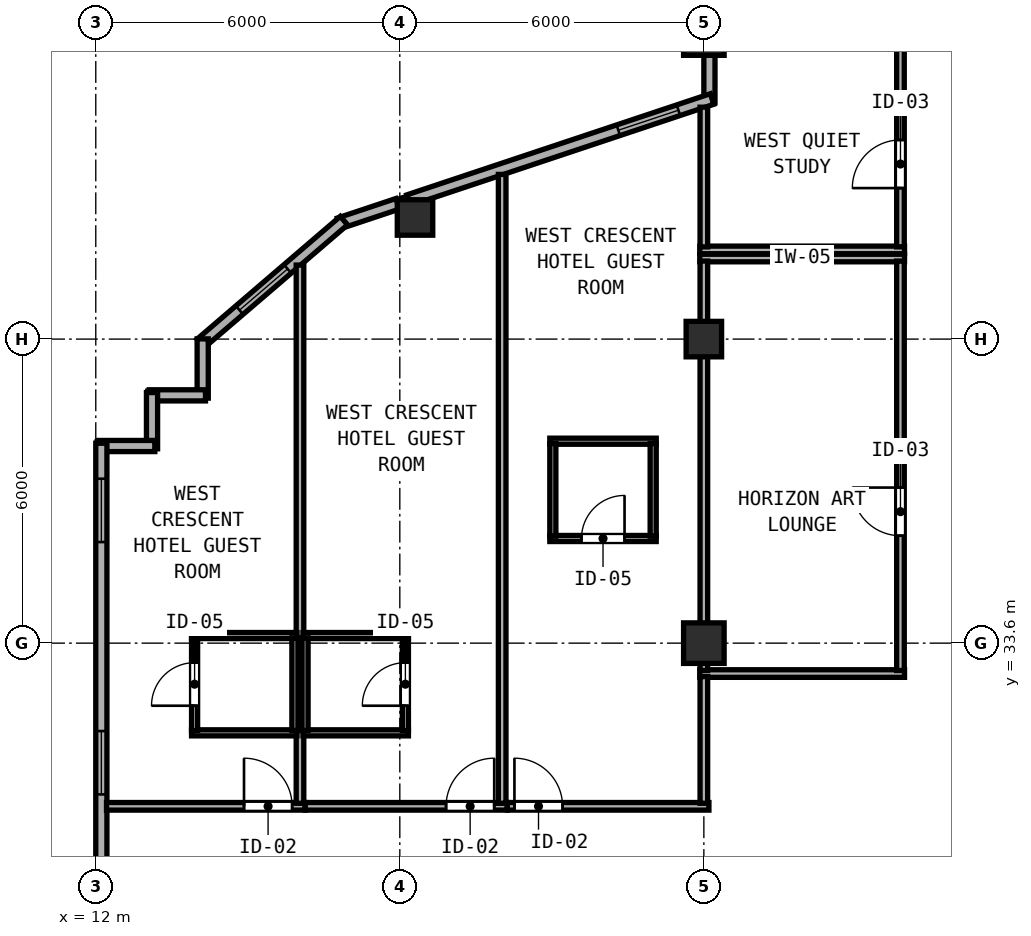
"""IFC4 building model, lengths in metres.
Left out: names, types, materials, properties, quantities, classifications, styles, units other than length and angle.
Written with IfcOpenShell. Run it as: python <this file> out.ifc"""

import sys

from ifc_helpers import new_model, si_unit, direction, frame, frame_2d, origin, origin_2d, place, context, subcontext, project, spatial, rectangle, hollow_rectangle, extrude, element, fill, save


model = new_model("IFC4")
c1 = context("Model", 3, precision=1e-05, world=origin(), true_north=direction((0.0, 1.0)))
c2 = subcontext(c1, "Body", "Model", "MODEL_VIEW")
j1 = project(units=[si_unit("LENGTHUNIT", "METRE"), si_unit("PLANEANGLEUNIT", "RADIAN")], contexts=[c1])
p1 = place(None, origin())
s1 = spatial("IfcSite", under=j1, at=p1, CompositionType="ELEMENT")
p2 = place(p1, origin())
s2 = spatial("IfcBuilding", under=s1, at=p2, CompositionType="ELEMENT")
p3 = place(p2, frame((0.0, 0.0, 254.45)))
s3 = spatial("IfcBuildingStorey", under=s2, at=p3, CompositionType="ELEMENT", Elevation=254.45)
for number, where, z_axis, x_axis in (
    (1, (24.0, 33.6, 0.0), (0.0, 0.0, 1.0), (1.0, 0.0, 0.0)),
    (2, (24.0, 45.6, 0.0), (0.0, 0.0, 1.0), (1.0, 0.0, 0.0)),
):
    element("IfcColumn", number, at=place(p3, frame(where, z_axis=z_axis, x_axis=x_axis)), inside=s3, PredefinedType="COLUMN", context=c2, shape_type="SweptSolid", body=[
        extrude(hollow_rectangle(XDim=0.8, YDim=0.8, WallThickness=0.03, at=origin_2d()), origin(), (0.0, 0.0, 1.0), 3.85),
    ])
for number, where, z_axis, x_axis in (
    (3, (24.0, 39.6, 0.0), (0.0, 0.0, 1.0), (1.0, 0.0, 0.0)),
    (4, (18.3, 42.0, 0.0), (0.0, 0.0, 1.0), (1.0, 0.0, 0.0)),
):
    element("IfcColumn", number, at=place(p3, frame(where, z_axis=z_axis, x_axis=x_axis)), inside=s3, PredefinedType="COLUMN", context=c2, shape_type="SweptSolid", body=[
        extrude(hollow_rectangle(XDim=0.7, YDim=0.7, WallThickness=0.026, at=origin_2d()), origin(), (0.0, 0.0, 1.0), 3.85),
    ])
p4 = place(p3, frame((24.11, 45.208, 0.0), z_axis=(0.0, 0.0, 1.0), x_axis=(0.0, -1.0, 0.0)))
e5 = element("IfcWall", 5, at=p4, inside=s3, PredefinedType="SOLIDWALL", context=c2, shape_type="SweptSolid", body=[
    extrude(rectangle(XDim=0.942, YDim=0.22, at=frame_2d((0.471, 0.0))), origin(), (0.0, 0.0, 1.0), 3.315),
])
p5 = place(p3, frame((24.162, 44.338, 0.0), z_axis=(0.0, 0.0, 1.0), x_axis=(-0.948687165594, -0.31621616315, 0.0)))
e6 = element("IfcWall", 6, at=p5, inside=s3, PredefinedType="SOLIDWALL", context=c2, shape_type="SweptSolid", body=[
    extrude(rectangle(XDim=6.312, YDim=0.22, at=frame_2d((3.156, 0.0))), origin(), (0.0, 0.0, 1.0), 3.315),
])
p6 = place(p5, frame((0.7, 0.0, 0.85)))
e7 = element("IfcOpeningElement", 7, at=p6, cuts=e6, PredefinedType="OPENING", context=c2, shape_type="SweptSolid", body=[
    extrude(rectangle(XDim=1.25, YDim=1.95, at=frame_2d((0.625, 0.975))), frame((0.0, 0.12, 0.0), z_axis=(0.0, -1.0, 0.0), x_axis=(1.0, 0.0, 0.0)), (0.0, 0.0, 1.0), 0.24),
])
p7 = place(p3, frame((17.958, 42.27, 0.0), z_axis=(0.0, 0.0, 1.0), x_axis=(-0.948683298051, -0.316227766017, 0.0)))
e8 = element("IfcWall", 8, at=p7, inside=s3, PredefinedType="SOLIDWALL", context=c2, shape_type="SweptSolid", body=[
    extrude(rectangle(XDim=1.218, YDim=0.22, at=frame_2d((0.609, 0.0))), origin(), (0.0, 0.0, 1.0), 3.67),
])
p8 = place(p3, frame((16.897, 41.938, 0.0), z_axis=(0.0, 0.0, 1.0), x_axis=(-0.759279729622, -0.650764390686, 0.0)))
e9 = element("IfcWall", 9, at=p8, inside=s3, PredefinedType="SOLIDWALL", context=c2, shape_type="SweptSolid", body=[
    extrude(rectangle(XDim=3.726, YDim=0.22, at=frame_2d((1.863, 0.0))), origin(), (0.0, 0.0, 1.0), 3.67),
])
p9 = place(p8, frame((1.464, 0.0, 0.85)))
e10 = element("IfcOpeningElement", 10, at=p9, cuts=e9, PredefinedType="OPENING", context=c2, shape_type="SweptSolid", body=[
    extrude(rectangle(XDim=1.25, YDim=1.95, at=frame_2d((0.625, 0.975))), frame((0.0, 0.12, 0.0), z_axis=(0.0, -1.0, 0.0), x_axis=(1.0, 0.0, 0.0)), (0.0, 0.0, 1.0), 0.24),
])
p10 = place(p3, frame((14.11, 39.604, 0.0), z_axis=(0.0, 0.0, 1.0), x_axis=(0.0, -1.0, 0.0)))
e11 = element("IfcWall", 11, at=p10, inside=s3, PredefinedType="SOLIDWALL", context=c2, shape_type="SweptSolid", body=[
    extrude(rectangle(XDim=1.169, YDim=0.22, at=frame_2d((0.585, 0.0))), origin(), (0.0, 0.0, 1.0), 3.67),
])
p11 = place(p3, frame((14.165, 38.49, 0.0), z_axis=(0.0, 0.0, 1.0), x_axis=(-1.0, 0.0, 0.0)))
e12 = element("IfcWall", 12, at=p11, inside=s3, PredefinedType="SOLIDWALL", context=c2, shape_type="SweptSolid", body=[
    extrude(rectangle(XDim=1.11, YDim=0.22, at=frame_2d((0.555, 0.0))), origin(), (0.0, 0.0, 1.0), 3.67),
])
p12 = place(p3, frame((13.11, 38.545, 0.0), z_axis=(0.0, 0.0, 1.0), x_axis=(0.0, -1.0, 0.0)))
e13 = element("IfcWall", 13, at=p12, inside=s3, PredefinedType="SOLIDWALL", context=c2, shape_type="SweptSolid", body=[
    extrude(rectangle(XDim=1.11, YDim=0.22, at=frame_2d((0.555, 0.0))), origin(), (0.0, 0.0, 1.0), 3.67),
])
p13 = place(p3, frame((13.165, 37.49, 0.0), z_axis=(0.0, 0.0, 1.0), x_axis=(-1.0, 0.0, 0.0)))
e14 = element("IfcWall", 14, at=p13, inside=s3, PredefinedType="SOLIDWALL", context=c2, shape_type="SweptSolid", body=[
    extrude(rectangle(XDim=1.11, YDim=0.22, at=frame_2d((0.555, 0.0))), origin(), (0.0, 0.0, 1.0), 3.67),
])
p14 = place(p3, frame((12.11, 37.545, 0.0), z_axis=(0.0, 0.0, 1.0), x_axis=(0.0, -1.0, 0.0)))
e15 = element("IfcWall", 15, at=p14, inside=s3, PredefinedType="SOLIDWALL", context=c2, shape_type="SweptSolid", body=[
    extrude(rectangle(XDim=21.145, YDim=0.22, at=frame_2d((10.573, 0.0))), origin(), (0.0, 0.0, 1.0), 3.67),
])
p15 = place(p14, frame((0.7, 0.0, 0.85)))
e16 = element("IfcOpeningElement", 16, at=p15, cuts=e15, PredefinedType="OPENING", context=c2, shape_type="SweptSolid", body=[
    extrude(rectangle(XDim=1.25, YDim=1.95, at=frame_2d((0.625, 0.975))), frame((0.0, 0.12, 0.0), z_axis=(0.0, -1.0, 0.0), x_axis=(1.0, 0.0, 0.0)), (0.0, 0.0, 1.0), 0.24),
])
p16 = place(p14, frame((5.68, 0.0, 0.85)))
e17 = element("IfcOpeningElement", 17, at=p16, cuts=e15, PredefinedType="OPENING", context=c2, shape_type="SweptSolid", body=[
    extrude(rectangle(XDim=1.25, YDim=1.95, at=frame_2d((0.625, 0.975))), frame((0.0, 0.12, 0.0), z_axis=(0.0, -1.0, 0.0), x_axis=(1.0, 0.0, 0.0)), (0.0, 0.0, 1.0), 0.24),
])
p17 = place(p14, frame((11.5, 0.0, 0.85)))
e18 = element("IfcOpeningElement", 18, at=p17, cuts=e15, PredefinedType="OPENING", context=c2, shape_type="SweptSolid", body=[
    extrude(rectangle(XDim=1.25, YDim=1.95, at=frame_2d((0.625, 0.975))), frame((0.0, 0.12, 0.0), z_axis=(0.0, -1.0, 0.0), x_axis=(1.0, 0.0, 0.0)), (0.0, 0.0, 1.0), 0.24),
])
p18 = place(p14, frame((16.9, 0.0, 0.85)))
e19 = element("IfcOpeningElement", 19, at=p18, cuts=e15, PredefinedType="OPENING", context=c2, shape_type="SweptSolid", body=[
    extrude(rectangle(XDim=1.25, YDim=1.95, at=frame_2d((0.625, 0.975))), frame((0.0, 0.12, 0.0), z_axis=(0.0, -1.0, 0.0), x_axis=(1.0, 0.0, 0.0)), (0.0, 0.0, 1.0), 0.24),
])
for number, where, z_axis, x_axis in (
    (20, (23.92, 41.2, 0.0), (0.0, 0.0, 1.0), (1.0, 0.0, 0.0)),
    (21, (23.92, 33.0, 0.0), (0.0, 0.0, 1.0), (1.0, 0.0, 0.0)),
):
    element("IfcWall", number, at=place(p3, frame(where, z_axis=z_axis, x_axis=x_axis)), inside=s3, PredefinedType="PARTITIONING", context=c2, shape_type="SweptSolid", body=[
        extrude(rectangle(XDim=4.04, YDim=0.15, at=frame_2d((2.02, 0.0))), origin(), (0.0, 0.0, 1.0), 3.67),
    ])
p19 = place(p3, frame((24.0, 33.06, 0.0), z_axis=(0.0, 0.0, 1.0), x_axis=(0.0, 1.0, 0.0)))
e22 = element("IfcWall", 22, at=p19, inside=s3, PredefinedType="PARTITIONING", context=c2, shape_type="SweptSolid", body=[
    extrude(rectangle(XDim=8.08, YDim=0.15, at=frame_2d((4.04, 0.0))), origin(), (0.0, 0.0, 1.0), 3.315),
])
p20 = place(p3, frame((27.88, 33.06, 0.0), z_axis=(0.0, 0.0, 1.0), x_axis=(0.0, 1.0, 0.0)))
e23 = element("IfcWall", 23, at=p20, inside=s3, PredefinedType="PARTITIONING", context=c2, shape_type="SweptSolid", body=[
    extrude(rectangle(XDim=8.08, YDim=0.15, at=frame_2d((4.04, 0.0))), origin(), (0.0, 0.0, 1.0), 3.67),
])
p21 = place(p20, frame((3.61, 0.0, 0.0), z_axis=(0.0, 0.0, 1.0), x_axis=(-1.0, 0.0, 0.0)))
e24 = element("IfcOpeningElement", 24, at=p21, cuts=e23, PredefinedType="OPENING", context=c2, shape_type="SweptSolid", body=[
    extrude(rectangle(XDim=0.95, YDim=2.12, at=frame_2d((0.475, 1.06))), frame((0.0, 0.085, 0.0), z_axis=(0.0, -1.0, 0.0), x_axis=(1.0, 0.0, 0.0)), (0.0, 0.0, 1.0), 0.17),
])
p22 = place(p3, frame((23.92, 41.36, 0.0), z_axis=(0.0, 0.0, 1.0), x_axis=(1.0, 0.0, 0.0)))
e25 = element("IfcWall", 25, at=p22, inside=s3, PredefinedType="PARTITIONING", context=c2, shape_type="SweptSolid", body=[
    extrude(rectangle(XDim=4.04, YDim=0.15, at=frame_2d((2.02, 0.0))), origin(), (0.0, 0.0, 1.0), 3.67),
])
p23 = place(p3, frame((24.0, 41.42, 0.0), z_axis=(0.0, 0.0, 1.0), x_axis=(0.0, 1.0, 0.0)))
e26 = element("IfcWall", 26, at=p23, inside=s3, PredefinedType="PARTITIONING", context=c2, shape_type="SweptSolid", body=[
    extrude(rectangle(XDim=2.757, YDim=0.15, at=frame_2d((1.378, 0.0))), origin(), (0.0, 0.0, 1.0), 3.315),
])
p24 = place(p3, frame((27.88, 41.42, 0.0), z_axis=(0.0, 0.0, 1.0), x_axis=(0.0, 1.0, 0.0)))
e27 = element("IfcWall", 27, at=p24, inside=s3, PredefinedType="PARTITIONING", context=c2, shape_type="SweptSolid", body=[
    extrude(rectangle(XDim=4.54, YDim=0.15, at=frame_2d((2.27, 0.0))), origin(), (0.0, 0.0, 1.0), 3.67),
])
p25 = place(p24, frame((2.11, 0.0, 0.0), z_axis=(0.0, 0.0, 1.0), x_axis=(-1.0, 0.0, 0.0)))
e28 = element("IfcOpeningElement", 28, at=p25, cuts=e27, PredefinedType="OPENING", context=c2, shape_type="SweptSolid", body=[
    extrude(rectangle(XDim=0.95, YDim=2.12, at=frame_2d((0.475, 1.06))), frame((0.0, 0.085, 0.0), z_axis=(0.0, -1.0, 0.0), x_axis=(1.0, 0.0, 0.0)), (0.0, 0.0, 1.0), 0.17),
])
p26 = place(p3, frame((12.212, 30.38, 0.0), z_axis=(0.0, 0.0, 1.0), x_axis=(1.0, 0.0, 0.0)))
e29 = element("IfcWall", 29, at=p26, inside=s3, PredefinedType="PARTITIONING", context=c2, shape_type="SweptSolid", body=[
    extrude(rectangle(XDim=3.918, YDim=0.15, at=frame_2d((1.959, 0.0))), origin(), (0.0, 0.0, 1.0), 3.67),
])
p27 = place(p26, frame((2.713, 0.0, 0.0)))
e30 = element("IfcOpeningElement", 30, at=p27, cuts=e29, PredefinedType="OPENING", context=c2, shape_type="SweptSolid", body=[
    extrude(rectangle(XDim=0.95, YDim=2.15, at=frame_2d((0.475, 1.075))), frame((0.0, 0.085, 0.0), z_axis=(0.0, -1.0, 0.0), x_axis=(1.0, 0.0, 0.0)), (0.0, 0.0, 1.0), 0.17),
])
p28 = place(p3, frame((16.03, 30.44, 0.0), z_axis=(0.0, 0.0, 1.0), x_axis=(0.0, 1.0, 0.0)))
e31 = element("IfcWall", 31, at=p28, inside=s3, PredefinedType="PARTITIONING", context=c2, shape_type="SweptSolid", body=[
    extrude(rectangle(XDim=10.621, YDim=0.15, at=frame_2d((5.311, 0.0))), origin(), (0.0, 0.0, 1.0), 3.67),
])
for number, where, z_axis, x_axis in (
    (32, (13.89, 33.75, 0.0), (0.0, 0.0, 1.0), (1.0, 0.0, 0.0)),
    (33, (13.89, 31.83, 0.0), (0.0, 0.0, 1.0), (1.0, 0.0, 0.0)),
):
    element("IfcWall", number, at=place(p3, frame(where, z_axis=z_axis, x_axis=x_axis)), inside=s3, PredefinedType="PARTITIONING", context=c2, shape_type="SweptSolid", body=[
        extrude(rectangle(XDim=2.08, YDim=0.12, at=frame_2d((1.04, 0.0))), origin(), (0.0, 0.0, 1.0), 3.67),
    ])
p29 = place(p3, frame((13.95, 31.875, 0.0), z_axis=(0.0, 0.0, 1.0), x_axis=(0.0, 1.0, 0.0)))
e34 = element("IfcWall", 34, at=p29, inside=s3, PredefinedType="PARTITIONING", context=c2, shape_type="SweptSolid", body=[
    extrude(rectangle(XDim=1.83, YDim=0.12, at=frame_2d((0.915, 0.0))), origin(), (0.0, 0.0, 1.0), 3.67),
])
p30 = place(p29, frame((1.34, 0.0, 0.0), z_axis=(0.0, 0.0, 1.0), x_axis=(-1.0, 0.0, 0.0)))
e35 = element("IfcOpeningElement", 35, at=p30, cuts=e34, PredefinedType="OPENING", context=c2, shape_type="SweptSolid", body=[
    extrude(rectangle(XDim=0.85, YDim=2.1, at=frame_2d((0.425, 1.05))), frame((0.0, 0.07, 0.0), z_axis=(0.0, -1.0, 0.0), x_axis=(1.0, 0.0, 0.0)), (0.0, 0.0, 1.0), 0.14),
])
p31 = place(p3, frame((15.93, 31.875, 0.0), z_axis=(0.0, 0.0, 1.0), x_axis=(0.0, 1.0, 0.0)))
e36 = element("IfcWall", 36, at=p31, inside=s3, PredefinedType="PARTITIONING", context=c2, shape_type="SweptSolid", body=[
    extrude(rectangle(XDim=1.83, YDim=0.12, at=frame_2d((0.915, 0.0))), origin(), (0.0, 0.0, 1.0), 3.67),
])
p32 = place(p3, frame((16.132, 30.38, 0.0), z_axis=(0.0, 0.0, 1.0), x_axis=(1.0, 0.0, 0.0)))
e37 = element("IfcWall", 37, at=p32, inside=s3, PredefinedType="PARTITIONING", context=c2, shape_type="SweptSolid", body=[
    extrude(rectangle(XDim=3.988, YDim=0.15, at=frame_2d((1.994, 0.0))), origin(), (0.0, 0.0, 1.0), 3.67),
])
p33 = place(p32, frame((2.781, 0.0, 0.0)))
e38 = element("IfcOpeningElement", 38, at=p33, cuts=e37, PredefinedType="OPENING", context=c2, shape_type="SweptSolid", body=[
    extrude(rectangle(XDim=0.95, YDim=2.15, at=frame_2d((0.475, 1.075))), frame((0.0, 0.085, 0.0), z_axis=(0.0, -1.0, 0.0), x_axis=(1.0, 0.0, 0.0)), (0.0, 0.0, 1.0), 0.17),
])
p34 = place(p3, frame((20.02, 30.44, 0.0), z_axis=(0.0, 0.0, 1.0), x_axis=(0.0, 1.0, 0.0)))
e39 = element("IfcWall", 39, at=p34, inside=s3, PredefinedType="PARTITIONING", context=c2, shape_type="SweptSolid", body=[
    extrude(rectangle(XDim=12.41, YDim=0.15, at=frame_2d((6.205, 0.0))), origin(), (0.0, 0.0, 1.0), 3.67),
])
for number, where, z_axis, x_axis in (
    (40, (16.09, 33.75, 0.0), (0.0, 0.0, 1.0), (1.0, 0.0, 0.0)),
    (41, (16.09, 31.83, 0.0), (0.0, 0.0, 1.0), (1.0, 0.0, 0.0)),
):
    element("IfcWall", number, at=place(p3, frame(where, z_axis=z_axis, x_axis=x_axis)), inside=s3, PredefinedType="PARTITIONING", context=c2, shape_type="SweptSolid", body=[
        extrude(rectangle(XDim=2.08, YDim=0.12, at=frame_2d((1.04, 0.0))), origin(), (0.0, 0.0, 1.0), 3.67),
    ])
p35 = place(p3, frame((16.13, 31.875, 0.0), z_axis=(0.0, 0.0, 1.0), x_axis=(0.0, 1.0, 0.0)))
e42 = element("IfcWall", 42, at=p35, inside=s3, PredefinedType="PARTITIONING", context=c2, shape_type="SweptSolid", body=[
    extrude(rectangle(XDim=1.83, YDim=0.12, at=frame_2d((0.915, 0.0))), origin(), (0.0, 0.0, 1.0), 3.67),
])
p36 = place(p3, frame((18.11, 31.875, 0.0), z_axis=(0.0, 0.0, 1.0), x_axis=(0.0, 1.0, 0.0)))
e43 = element("IfcWall", 43, at=p36, inside=s3, PredefinedType="PARTITIONING", context=c2, shape_type="SweptSolid", body=[
    extrude(rectangle(XDim=1.83, YDim=0.12, at=frame_2d((0.915, 0.0))), origin(), (0.0, 0.0, 1.0), 3.67),
])
p37 = place(p36, frame((0.49, 0.0, 0.0)))
e44 = element("IfcOpeningElement", 44, at=p37, cuts=e43, PredefinedType="OPENING", context=c2, shape_type="SweptSolid", body=[
    extrude(rectangle(XDim=0.85, YDim=2.1, at=frame_2d((0.425, 1.05))), frame((0.0, 0.07, 0.0), z_axis=(0.0, -1.0, 0.0), x_axis=(1.0, 0.0, 0.0)), (0.0, 0.0, 1.0), 0.14),
])
p38 = place(p3, frame((20.122, 30.38, 0.0), z_axis=(0.0, 0.0, 1.0), x_axis=(1.0, 0.0, 0.0)))
e45 = element("IfcWall", 45, at=p38, inside=s3, PredefinedType="PARTITIONING", context=c2, shape_type="SweptSolid", body=[
    extrude(rectangle(XDim=3.978, YDim=0.15, at=frame_2d((1.989, 0.0))), origin(), (0.0, 0.0, 1.0), 3.67),
])
p39 = place(p38, frame((0.14, 0.0, 0.0)))
e46 = element("IfcOpeningElement", 46, at=p39, cuts=e45, PredefinedType="OPENING", context=c2, shape_type="SweptSolid", body=[
    extrude(rectangle(XDim=0.95, YDim=2.15, at=frame_2d((0.475, 1.075))), frame((0.0, 0.085, 0.0), z_axis=(0.0, -1.0, 0.0), x_axis=(1.0, 0.0, 0.0)), (0.0, 0.0, 1.0), 0.17),
])
p40 = place(p3, frame((24.0, 30.44, 0.0), z_axis=(0.0, 0.0, 1.0), x_axis=(0.0, 1.0, 0.0)))
e47 = element("IfcWall", 47, at=p40, inside=s3, PredefinedType="PARTITIONING", context=c2, shape_type="SweptSolid", body=[
    extrude(rectangle(XDim=2.5, YDim=0.15, at=frame_2d((1.25, 0.0))), origin(), (0.0, 0.0, 1.0), 3.315),
])
p41 = place(p3, frame((20.96, 37.585, 0.0), z_axis=(0.0, 0.0, 1.0), x_axis=(1.0, 0.0, 0.0)))
e48 = element("IfcWall", 48, at=p41, inside=s3, PredefinedType="PARTITIONING", context=c2, shape_type="SweptSolid", body=[
    extrude(rectangle(XDim=2.1, YDim=0.12, at=frame_2d((1.05, 0.0))), origin(), (0.0, 0.0, 1.0), 3.67),
])
p42 = place(p3, frame((20.96, 35.665, 0.0), z_axis=(0.0, 0.0, 1.0), x_axis=(1.0, 0.0, 0.0)))
e49 = element("IfcWall", 49, at=p42, inside=s3, PredefinedType="PARTITIONING", context=c2, shape_type="SweptSolid", body=[
    extrude(rectangle(XDim=2.1, YDim=0.12, at=frame_2d((1.05, 0.0))), origin(), (0.0, 0.0, 1.0), 3.67),
])
p43 = place(p42, frame((0.625, 0.0, 0.0)))
e50 = element("IfcOpeningElement", 50, at=p43, cuts=e49, PredefinedType="OPENING", context=c2, shape_type="SweptSolid", body=[
    extrude(rectangle(XDim=0.85, YDim=2.1, at=frame_2d((0.425, 1.05))), frame((0.0, 0.07, 0.0), z_axis=(0.0, -1.0, 0.0), x_axis=(1.0, 0.0, 0.0)), (0.0, 0.0, 1.0), 0.14),
])
for number, where, z_axis, x_axis in (
    (51, (21.02, 35.71, 0.0), (0.0, 0.0, 1.0), (0.0, 1.0, 0.0)),
    (52, (23.0, 35.71, 0.0), (0.0, 0.0, 1.0), (0.0, 1.0, 0.0)),
):
    element("IfcWall", number, at=place(p3, frame(where, z_axis=z_axis, x_axis=x_axis)), inside=s3, PredefinedType="PARTITIONING", context=c2, shape_type="SweptSolid", body=[
        extrude(rectangle(XDim=1.83, YDim=0.12, at=frame_2d((0.915, 0.0))), origin(), (0.0, 0.0, 1.0), 3.67),
    ])
p44 = place(p6, origin())
e53 = element("IfcWindow", 53, at=p44, inside=s3, PartitioningType="SINGLE_PANEL", PredefinedType="WINDOW", context=c2, shape_type="SweptSolid", body=[
    extrude(rectangle(XDim=1.25, YDim=1.95, at=frame_2d((0.625, 0.975))), frame((0.0, 0.03, 0.0), z_axis=(0.0, -1.0, 0.0), x_axis=(1.0, 0.0, 0.0)), (0.0, 0.0, 1.0), 0.06),
])
fill(e7, e53)
p45 = place(p9, origin())
e54 = element("IfcWindow", 54, at=p45, inside=s3, PartitioningType="SINGLE_PANEL", PredefinedType="WINDOW", context=c2, shape_type="SweptSolid", body=[
    extrude(rectangle(XDim=1.25, YDim=1.95, at=frame_2d((0.625, 0.975))), frame((0.0, 0.03, 0.0), z_axis=(0.0, -1.0, 0.0), x_axis=(1.0, 0.0, 0.0)), (0.0, 0.0, 1.0), 0.06),
])
fill(e10, e54)
p46 = place(p15, origin())
e55 = element("IfcWindow", 55, at=p46, inside=s3, PartitioningType="SINGLE_PANEL", PredefinedType="WINDOW", context=c2, shape_type="SweptSolid", body=[
    extrude(rectangle(XDim=1.25, YDim=1.95, at=frame_2d((0.625, 0.975))), frame((0.0, 0.03, 0.0), z_axis=(0.0, -1.0, 0.0), x_axis=(1.0, 0.0, 0.0)), (0.0, 0.0, 1.0), 0.06),
])
fill(e16, e55)
p47 = place(p16, origin())
e56 = element("IfcWindow", 56, at=p47, inside=s3, PartitioningType="SINGLE_PANEL", PredefinedType="WINDOW", context=c2, shape_type="SweptSolid", body=[
    extrude(rectangle(XDim=1.25, YDim=1.95, at=frame_2d((0.625, 0.975))), frame((0.0, 0.03, 0.0), z_axis=(0.0, -1.0, 0.0), x_axis=(1.0, 0.0, 0.0)), (0.0, 0.0, 1.0), 0.06),
])
fill(e17, e56)
p48 = place(p21, origin())
e57 = element("IfcDoor", 57, at=p48, inside=s3, OperationType="SINGLE_SWING_LEFT", PredefinedType="DOOR", context=c2, shape_type="SweptSolid", body=[
    extrude(rectangle(XDim=0.95, YDim=2.12, at=frame_2d((0.475, 1.06))), frame((0.0, 0.025, 0.0), z_axis=(0.0, -1.0, 0.0), x_axis=(1.0, 0.0, 0.0)), (0.0, 0.0, 1.0), 0.05),
])
fill(e24, e57)
p49 = place(p25, origin())
e58 = element("IfcDoor", 58, at=p49, inside=s3, OperationType="SINGLE_SWING_RIGHT", PredefinedType="DOOR", context=c2, shape_type="SweptSolid", body=[
    extrude(rectangle(XDim=0.95, YDim=2.12, at=frame_2d((0.475, 1.06))), frame((0.0, 0.025, 0.0), z_axis=(0.0, -1.0, 0.0), x_axis=(1.0, 0.0, 0.0)), (0.0, 0.0, 1.0), 0.05),
])
fill(e28, e58)
p50 = place(p27, origin())
e59 = element("IfcDoor", 59, at=p50, inside=s3, OperationType="SINGLE_SWING_LEFT", PredefinedType="DOOR", context=c2, shape_type="SweptSolid", body=[
    extrude(rectangle(XDim=0.95, YDim=2.15, at=frame_2d((0.475, 1.075))), frame((0.0, 0.025, 0.0), z_axis=(0.0, -1.0, 0.0), x_axis=(1.0, 0.0, 0.0)), (0.0, 0.0, 1.0), 0.05),
])
fill(e30, e59)
p51 = place(p30, origin())
e60 = element("IfcDoor", 60, at=p51, inside=s3, OperationType="SINGLE_SWING_RIGHT", PredefinedType="DOOR", context=c2, shape_type="SweptSolid", body=[
    extrude(rectangle(XDim=0.85, YDim=2.1, at=frame_2d((0.425, 1.05))), frame((0.0, 0.025, 0.0), z_axis=(0.0, -1.0, 0.0), x_axis=(1.0, 0.0, 0.0)), (0.0, 0.0, 1.0), 0.05),
])
fill(e35, e60)
p52 = place(p33, origin())
e61 = element("IfcDoor", 61, at=p52, inside=s3, OperationType="SINGLE_SWING_RIGHT", PredefinedType="DOOR", context=c2, shape_type="SweptSolid", body=[
    extrude(rectangle(XDim=0.95, YDim=2.15, at=frame_2d((0.475, 1.075))), frame((0.0, 0.025, 0.0), z_axis=(0.0, -1.0, 0.0), x_axis=(1.0, 0.0, 0.0)), (0.0, 0.0, 1.0), 0.05),
])
fill(e38, e61)
p53 = place(p37, origin())
e62 = element("IfcDoor", 62, at=p53, inside=s3, OperationType="SINGLE_SWING_LEFT", PredefinedType="DOOR", context=c2, shape_type="SweptSolid", body=[
    extrude(rectangle(XDim=0.85, YDim=2.1, at=frame_2d((0.425, 1.05))), frame((0.0, 0.025, 0.0), z_axis=(0.0, -1.0, 0.0), x_axis=(1.0, 0.0, 0.0)), (0.0, 0.0, 1.0), 0.05),
])
fill(e44, e62)
p54 = place(p39, origin())
e63 = element("IfcDoor", 63, at=p54, inside=s3, OperationType="SINGLE_SWING_LEFT", PredefinedType="DOOR", context=c2, shape_type="SweptSolid", body=[
    extrude(rectangle(XDim=0.95, YDim=2.15, at=frame_2d((0.475, 1.075))), frame((0.0, 0.025, 0.0), z_axis=(0.0, -1.0, 0.0), x_axis=(1.0, 0.0, 0.0)), (0.0, 0.0, 1.0), 0.05),
])
fill(e46, e63)
p55 = place(p43, origin())
e64 = element("IfcDoor", 64, at=p55, inside=s3, OperationType="SINGLE_SWING_RIGHT", PredefinedType="DOOR", context=c2, shape_type="SweptSolid", body=[
    extrude(rectangle(XDim=0.85, YDim=2.1, at=frame_2d((0.425, 1.05))), frame((0.0, 0.025, 0.0), z_axis=(0.0, -1.0, 0.0), x_axis=(1.0, 0.0, 0.0)), (0.0, 0.0, 1.0), 0.05),
])
fill(e50, e64)
save(model, sys.argv[1])
